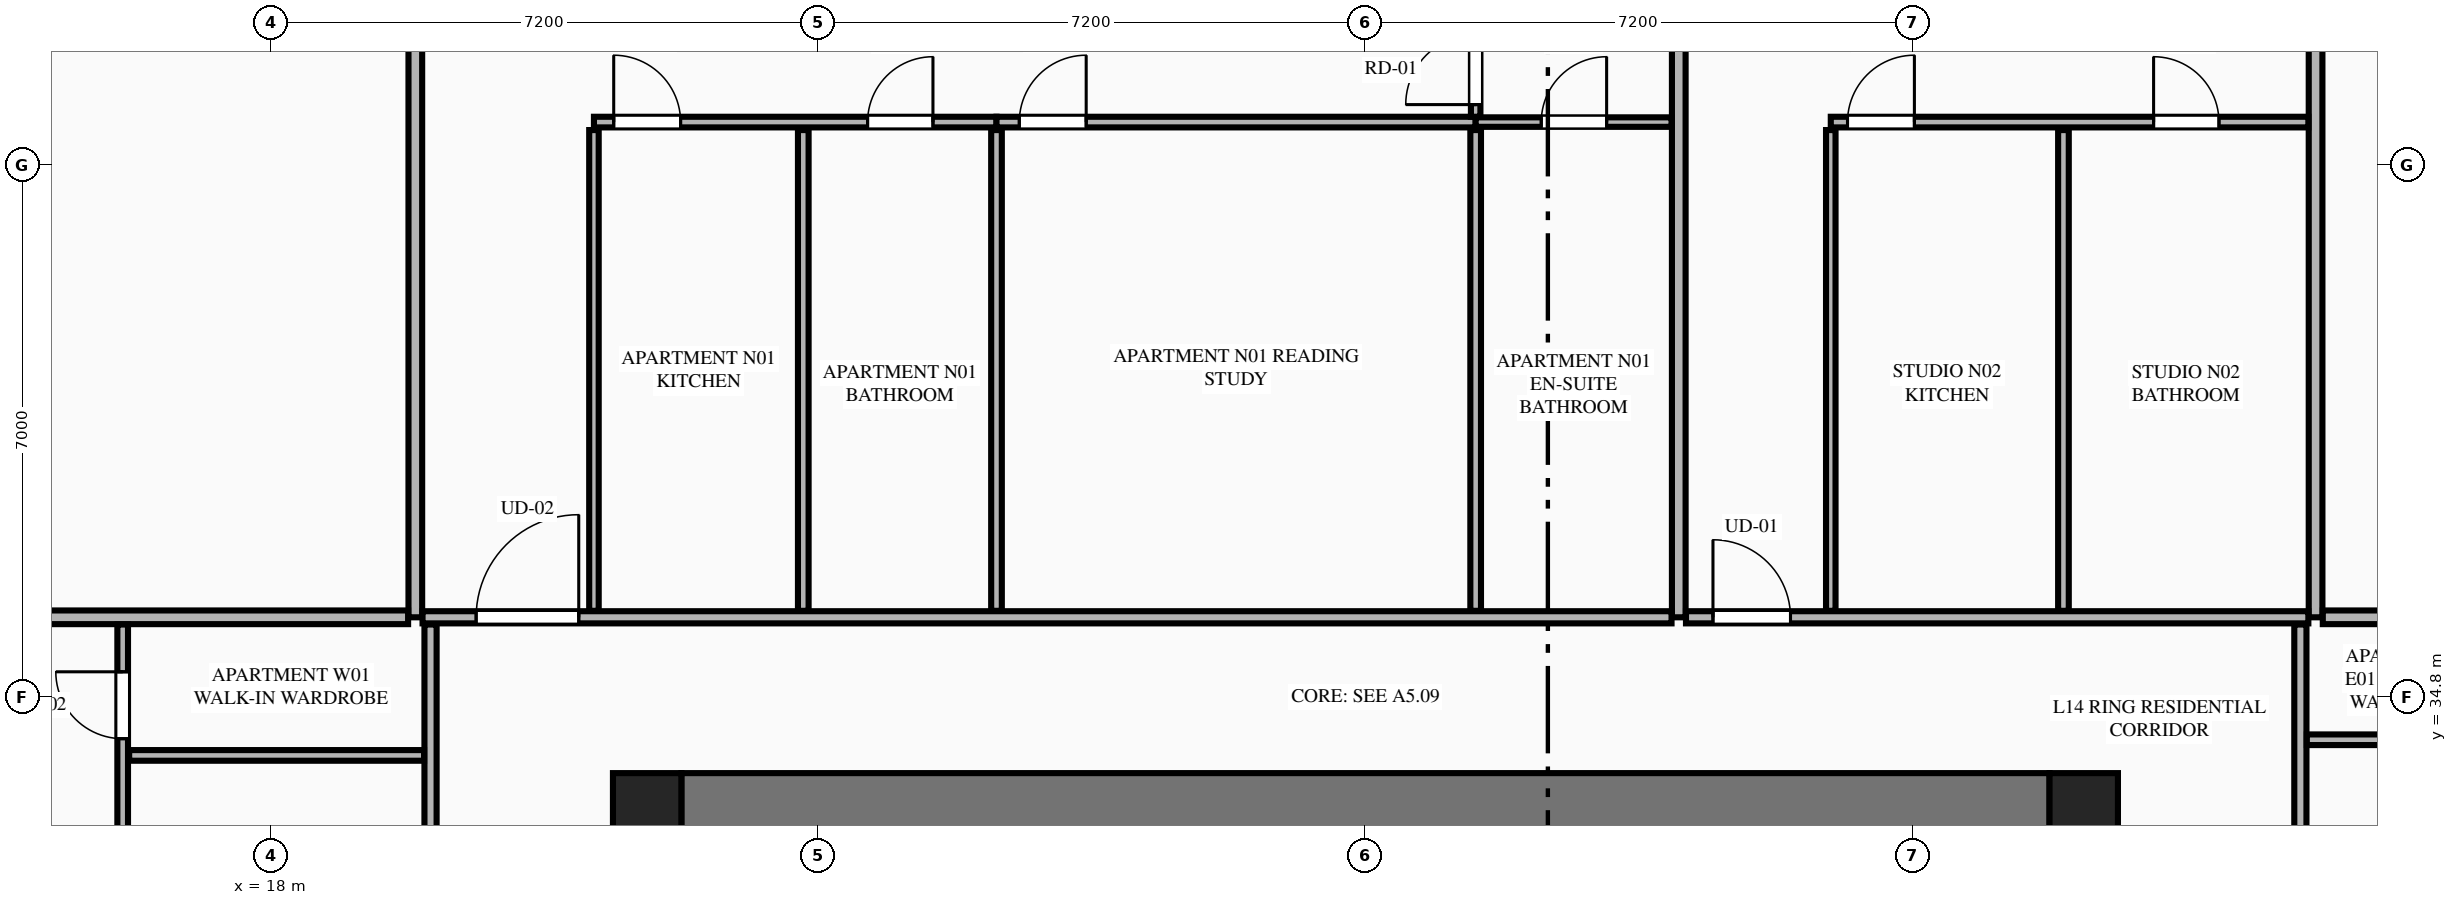
"""IFC4 building model, lengths in metres.
Left out: names, types, materials, properties, quantities, classifications, styles, units other than length and angle.
Written with IfcOpenShell. Run it as: python <this file> out.ifc"""

import sys

from ifc_helpers import new_model, si_unit, direction, frame, frame_2d, origin, origin_2d, place, context, subcontext, project, spatial, rectangle, extrude, element, fill, save


model = new_model("IFC4")
c1 = context("Model", 3, precision=1e-05, world=origin(), true_north=direction((0.0, 1.0)))
c2 = subcontext(c1, "Body", "Model", "MODEL_VIEW")
j1 = project(units=[si_unit("LENGTHUNIT", "METRE"), si_unit("PLANEANGLEUNIT", "RADIAN")], contexts=[c1])
p1 = place(None, origin())
s1 = spatial("IfcSite", under=j1, at=p1, CompositionType="ELEMENT")
p2 = place(p1, origin())
s2 = spatial("IfcBuilding", under=s1, at=p2, CompositionType="ELEMENT")
p3 = place(p2, frame((0.0, 0.0, 56.85)))
s3 = spatial("IfcBuildingStorey", under=s2, at=p3, CompositionType="ELEMENT", Elevation=56.85)
for number, where, z_axis, x_axis in (
    (1, (41.85, 33.35, 0.0), (0.0, 0.0, 1.0), (1.0, 0.0, 0.0)),
    (2, (22.95, 33.35, 0.0), (0.0, 0.0, 1.0), (1.0, 0.0, 0.0)),
):
    element("IfcColumn", number, at=place(p3, frame(where, z_axis=z_axis, x_axis=x_axis)), inside=s3, PredefinedType="COLUMN", context=c2, shape_type="SweptSolid", body=[
        extrude(rectangle(XDim=0.9, YDim=0.9, at=origin_2d()), origin(), (0.0, 0.0, 1.0), 3.55),
    ])
p4 = place(p3, frame((23.4, 33.35, 0.0), z_axis=(0.0, 0.0, 1.0), x_axis=(1.0, 0.0, 0.0)))
e3 = element("IfcWall", 3, at=p4, inside=s3, PredefinedType="SHEAR", context=c2, shape_type="SweptSolid", body=[
    extrude(rectangle(XDim=18.0, YDim=0.9, at=frame_2d((9.0, 0.0))), origin(), (0.0, 0.0, 1.0), 3.33),
])
p5 = place(p3, frame((15.634, 46.146, 0.0), z_axis=(0.0, 0.0, 1.0), x_axis=(-0.451697561555, -0.892171123095, 0.0)))
e4 = element("IfcWall", 4, at=p5, inside=s3, PredefinedType="STANDARD", context=c2, shape_type="SweptSolid", body=[
    extrude(rectangle(XDim=5.351, YDim=0.34, at=frame_2d((2.675, 0.0))), origin(), (0.0, 0.0, 1.0), 2.787),
])
p6 = place(p5, frame((2.125, 0.0, 0.75)))
e5 = element("IfcOpeningElement", 5, at=p6, cuts=e4, PredefinedType="OPENING", context=c2, shape_type="SweptSolid", body=[
    extrude(rectangle(XDim=1.1, YDim=1.887, at=frame_2d((0.55, 0.943))), frame((0.0, 0.18, 0.0), z_axis=(0.0, -1.0, 0.0), x_axis=(1.0, 0.0, 0.0)), (0.0, 0.0, 1.0), 0.36),
])
p7 = place(p3, frame((19.9, 35.85, 0.0), z_axis=(0.0, 0.0, 1.0), x_axis=(0.0, 1.0, 0.0)))
e6 = element("IfcWall", 6, at=p7, inside=s3, PredefinedType="PARTITIONING", context=c2, shape_type="SweptSolid", body=[
    extrude(rectangle(XDim=13.295, YDim=0.18, at=frame_2d((6.647, 0.0))), origin(), (0.0, 0.0, 1.0), 3.33),
])
p8 = place(p3, frame((36.522, 35.85, 0.0), z_axis=(0.0, 0.0, 1.0), x_axis=(0.0, 1.0, 0.0)))
e7 = element("IfcWall", 7, at=p8, inside=s3, PredefinedType="PARTITIONING", context=c2, shape_type="SweptSolid", body=[
    extrude(rectangle(XDim=13.295, YDim=0.18, at=frame_2d((6.647, 0.0))), origin(), (0.0, 0.0, 1.0), 2.7),
])
p9 = place(p3, frame((44.9, 35.85, 0.0), z_axis=(0.0, 0.0, 1.0), x_axis=(0.0, 1.0, 0.0)))
e8 = element("IfcWall", 8, at=p9, inside=s3, PredefinedType="PARTITIONING", context=c2, shape_type="SweptSolid", body=[
    extrude(rectangle(XDim=13.295, YDim=0.18, at=frame_2d((6.647, 0.0))), origin(), (0.0, 0.0, 1.0), 3.33),
])
p10 = place(p3, frame((19.995, 35.85, 0.0), z_axis=(0.0, 0.0, 1.0), x_axis=(1.0, 0.0, 0.0)))
e9 = element("IfcWall", 9, at=p10, inside=s3, PredefinedType="PARTITIONING", context=c2, shape_type="SweptSolid", body=[
    extrude(rectangle(XDim=16.432, YDim=0.16, at=frame_2d((8.216, 0.0))), origin(), (0.0, 0.0, 1.0), 3.33),
])
p11 = place(p10, frame((0.705, 0.0, 0.0)))
e10 = element("IfcOpeningElement", 10, at=p11, cuts=e9, PredefinedType="OPENING", context=c2, shape_type="SweptSolid", body=[
    extrude(rectangle(XDim=1.35, YDim=2.35, at=frame_2d((0.675, 1.175))), frame((0.0, 0.09, 0.0), z_axis=(0.0, -1.0, 0.0), x_axis=(1.0, 0.0, 0.0)), (0.0, 0.0, 1.0), 0.18),
])
p12 = place(p3, frame((22.25, 35.935, 0.0), z_axis=(0.0, 0.0, 1.0), x_axis=(0.0, 1.0, 0.0)))
e11 = element("IfcWall", 11, at=p12, inside=s3, PredefinedType="PARTITIONING", context=c2, shape_type="SweptSolid", body=[
    extrude(rectangle(XDim=6.325, YDim=0.125, at=frame_2d((3.163, 0.0))), origin(), (0.0, 0.0, 1.0), 2.7),
])
p13 = place(p3, frame((22.25, 42.365, 0.0), z_axis=(0.0, 0.0, 1.0), x_axis=(1.0, 0.0, 0.0)))
e12 = element("IfcWall", 12, at=p13, inside=s3, PredefinedType="PLUMBINGWALL", context=c2, shape_type="SweptSolid", body=[
    extrude(rectangle(XDim=5.296, YDim=0.14, at=frame_2d((2.648, 0.0))), origin(), (0.0, 0.0, 1.0), 3.33),
])
p14 = place(p13, frame((3.6, 0.0, 0.0)))
e13 = element("IfcOpeningElement", 13, at=p14, cuts=e12, PredefinedType="OPENING", context=c2, shape_type="SweptSolid", body=[
    extrude(rectangle(XDim=0.86, YDim=2.1, at=frame_2d((0.43, 1.05))), frame((0.0, 0.08, 0.0), z_axis=(0.0, -1.0, 0.0), x_axis=(1.0, 0.0, 0.0)), (0.0, 0.0, 1.0), 0.16),
])
p15 = place(p13, frame((0.26, 0.0, 0.0)))
e14 = element("IfcOpeningElement", 14, at=p15, cuts=e12, PredefinedType="OPENING", context=c2, shape_type="SweptSolid", body=[
    extrude(rectangle(XDim=0.88, YDim=2.15, at=frame_2d((0.44, 1.075))), frame((0.0, 0.08, 0.0), z_axis=(0.0, -1.0, 0.0), x_axis=(1.0, 0.0, 0.0)), (0.0, 0.0, 1.0), 0.16),
])
p16 = place(p3, frame((27.546, 42.365, 0.0), z_axis=(0.0, 0.0, 1.0), x_axis=(1.0, 0.0, 0.0)))
e15 = element("IfcWall", 15, at=p16, inside=s3, PredefinedType="PLUMBINGWALL", context=c2, shape_type="SweptSolid", body=[
    extrude(rectangle(XDim=6.304, YDim=0.14, at=frame_2d((3.152, 0.0))), origin(), (0.0, 0.0, 1.0), 3.33),
])
p17 = place(p16, frame((0.3, 0.0, 0.0)))
e16 = element("IfcOpeningElement", 16, at=p17, cuts=e15, PredefinedType="OPENING", context=c2, shape_type="SweptSolid", body=[
    extrude(rectangle(XDim=0.88, YDim=2.15, at=frame_2d((0.44, 1.075))), frame((0.0, 0.08, 0.0), z_axis=(0.0, -1.0, 0.0), x_axis=(1.0, 0.0, 0.0)), (0.0, 0.0, 1.0), 0.16),
])
p18 = place(p3, frame((33.85, 42.365, 0.0), z_axis=(0.0, 0.0, 1.0), x_axis=(1.0, 0.0, 0.0)))
e17 = element("IfcWall", 17, at=p18, inside=s3, PredefinedType="PARTITIONING", context=c2, shape_type="SweptSolid", body=[
    extrude(rectangle(XDim=2.577, YDim=0.125, at=frame_2d((1.289, 0.0))), origin(), (0.0, 0.0, 1.0), 3.33),
])
p19 = place(p18, frame((0.863, 0.0, 0.0)))
e18 = element("IfcOpeningElement", 18, at=p19, cuts=e17, PredefinedType="OPENING", context=c2, shape_type="SweptSolid", body=[
    extrude(rectangle(XDim=0.86, YDim=2.1, at=frame_2d((0.43, 1.05))), frame((0.0, 0.073, 0.0), z_axis=(0.0, -1.0, 0.0), x_axis=(1.0, 0.0, 0.0)), (0.0, 0.0, 1.0), 0.145),
])
p20 = place(p3, frame((25.004, 35.935, 0.0), z_axis=(0.0, 0.0, 1.0), x_axis=(0.0, 1.0, 0.0)))
e19 = element("IfcWall", 19, at=p20, inside=s3, PredefinedType="PLUMBINGWALL", context=c2, shape_type="SweptSolid", body=[
    extrude(rectangle(XDim=6.325, YDim=0.14, at=frame_2d((3.163, 0.0))), origin(), (0.0, 0.0, 1.0), 3.33),
])
p21 = place(p3, frame((33.85, 42.435, 0.0), z_axis=(0.0, 0.0, 1.0), x_axis=(0.0, 1.0, 0.0)))
e20 = element("IfcWall", 20, at=p21, inside=s3, PredefinedType="PARTITIONING", context=c2, shape_type="SweptSolid", body=[
    extrude(rectangle(XDim=1.33, YDim=0.125, at=frame_2d((0.665, 0.0))), origin(), (0.0, 0.0, 1.0), 3.33),
])
p22 = place(p21, frame((0.16, 0.0, 0.0)))
e21 = element("IfcOpeningElement", 21, at=p22, cuts=e20, PredefinedType="OPENING", context=c2, shape_type="SweptSolid", body=[
    extrude(rectangle(XDim=0.92, YDim=2.15, at=frame_2d((0.46, 1.075))), frame((0.0, 0.073, 0.0), z_axis=(0.0, -1.0, 0.0), x_axis=(1.0, 0.0, 0.0)), (0.0, 0.0, 1.0), 0.145),
])
for number, where, z_axis, x_axis in (
    (22, (27.546, 35.935, 0.0), (0.0, 0.0, 1.0), (0.0, 1.0, 0.0)),
    (23, (33.85, 35.935, 0.0), (0.0, 0.0, 1.0), (0.0, 1.0, 0.0)),
):
    element("IfcWall", number, at=place(p3, frame(where, z_axis=z_axis, x_axis=x_axis)), inside=s3, PredefinedType="PLUMBINGWALL", context=c2, shape_type="SweptSolid", body=[
        extrude(rectangle(XDim=6.325, YDim=0.14, at=frame_2d((3.163, 0.0))), origin(), (0.0, 0.0, 1.0), 3.33),
    ])
p23 = place(p3, frame((36.617, 35.85, 0.0), z_axis=(0.0, 0.0, 1.0), x_axis=(1.0, 0.0, 0.0)))
e24 = element("IfcWall", 24, at=p23, inside=s3, PredefinedType="PARTITIONING", context=c2, shape_type="SweptSolid", body=[
    extrude(rectangle(XDim=8.188, YDim=0.16, at=frame_2d((4.094, 0.0))), origin(), (0.0, 0.0, 1.0), 3.33),
])
p24 = place(p23, frame((0.355, 0.0, 0.0)))
e25 = element("IfcOpeningElement", 25, at=p24, cuts=e24, PredefinedType="OPENING", context=c2, shape_type="SweptSolid", body=[
    extrude(rectangle(XDim=1.02, YDim=2.25, at=frame_2d((0.51, 1.125))), frame((0.0, 0.09, 0.0), z_axis=(0.0, -1.0, 0.0), x_axis=(1.0, 0.0, 0.0)), (0.0, 0.0, 1.0), 0.18),
])
p25 = place(p3, frame((38.522, 35.935, 0.0), z_axis=(0.0, 0.0, 1.0), x_axis=(0.0, 1.0, 0.0)))
e26 = element("IfcWall", 26, at=p25, inside=s3, PredefinedType="PARTITIONING", context=c2, shape_type="SweptSolid", body=[
    extrude(rectangle(XDim=6.325, YDim=0.125, at=frame_2d((3.163, 0.0))), origin(), (0.0, 0.0, 1.0), 3.33),
])
p26 = place(p3, frame((38.522, 42.365, 0.0), z_axis=(0.0, 0.0, 1.0), x_axis=(1.0, 0.0, 0.0)))
e27 = element("IfcWall", 27, at=p26, inside=s3, PredefinedType="PLUMBINGWALL", context=c2, shape_type="SweptSolid", body=[
    extrude(rectangle(XDim=6.283, YDim=0.14, at=frame_2d((3.142, 0.0))), origin(), (0.0, 0.0, 1.0), 3.33),
])
p27 = place(p26, frame((4.247, 0.0, 0.0)))
e28 = element("IfcOpeningElement", 28, at=p27, cuts=e27, PredefinedType="OPENING", context=c2, shape_type="SweptSolid", body=[
    extrude(rectangle(XDim=0.86, YDim=2.1, at=frame_2d((0.43, 1.05))), frame((0.0, 0.08, 0.0), z_axis=(0.0, -1.0, 0.0), x_axis=(1.0, 0.0, 0.0)), (0.0, 0.0, 1.0), 0.16),
])
p28 = place(p26, frame((0.22, 0.0, 0.0)))
e29 = element("IfcOpeningElement", 29, at=p28, cuts=e27, PredefinedType="OPENING", context=c2, shape_type="SweptSolid", body=[
    extrude(rectangle(XDim=0.88, YDim=2.15, at=frame_2d((0.44, 1.075))), frame((0.0, 0.08, 0.0), z_axis=(0.0, -1.0, 0.0), x_axis=(1.0, 0.0, 0.0)), (0.0, 0.0, 1.0), 0.16),
])
p29 = place(p3, frame((41.583, 35.935, 0.0), z_axis=(0.0, 0.0, 1.0), x_axis=(0.0, 1.0, 0.0)))
e30 = element("IfcWall", 30, at=p29, inside=s3, PredefinedType="PLUMBINGWALL", context=c2, shape_type="SweptSolid", body=[
    extrude(rectangle(XDim=6.325, YDim=0.14, at=frame_2d((3.163, 0.0))), origin(), (0.0, 0.0, 1.0), 3.33),
])
for number, where, z_axis, x_axis in (
    (31, (10.665, 35.85, 0.0), (0.0, 0.0, 1.0), (1.0, 0.0, 0.0)),
    (32, (44.995, 35.85, 0.0), (0.0, 0.0, 1.0), (1.0, 0.0, 0.0)),
):
    element("IfcWall", number, at=place(p3, frame(where, z_axis=z_axis, x_axis=x_axis)), inside=s3, PredefinedType="PARTITIONING", context=c2, shape_type="SweptSolid", body=[
        extrude(rectangle(XDim=9.14, YDim=0.18, at=frame_2d((4.57, 0.0))), origin(), (0.0, 0.0, 1.0), 3.33),
    ])
p30 = place(p3, frame((20.1, 16.045, 0.0), z_axis=(0.0, 0.0, 1.0), x_axis=(0.0, 1.0, 0.0)))
e33 = element("IfcWall", 33, at=p30, inside=s3, PredefinedType="PARTITIONING", context=c2, shape_type="SweptSolid", body=[
    extrude(rectangle(XDim=19.71, YDim=0.16, at=frame_2d((9.855, 0.0))), origin(), (0.0, 0.0, 1.0), 2.7),
])
p31 = place(p30, frame((0.45, 0.0, 0.0)))
e34 = element("IfcOpeningElement", 34, at=p31, cuts=e33, PredefinedType="OPENING", context=c2, shape_type="SweptSolid", body=[
    extrude(rectangle(XDim=1.02, YDim=2.25, at=frame_2d((0.51, 1.125))), frame((0.0, 0.09, 0.0), z_axis=(0.0, -1.0, 0.0), x_axis=(1.0, 0.0, 0.0)), (0.0, 0.0, 1.0), 0.18),
])
p32 = place(p3, frame((16.05, 30.467, 0.0), z_axis=(0.0, 0.0, 1.0), x_axis=(0.0, 1.0, 0.0)))
e35 = element("IfcWall", 35, at=p32, inside=s3, PredefinedType="PLUMBINGWALL", context=c2, shape_type="SweptSolid", body=[
    extrude(rectangle(XDim=5.288, YDim=0.14, at=frame_2d((2.644, 0.0))), origin(), (0.0, 0.0, 1.0), 3.33),
])
p33 = place(p32, frame((0.22, 0.0, 0.0)))
e36 = element("IfcOpeningElement", 36, at=p33, cuts=e35, PredefinedType="OPENING", context=c2, shape_type="SweptSolid", body=[
    extrude(rectangle(XDim=0.86, YDim=2.1, at=frame_2d((0.43, 1.05))), frame((0.0, 0.08, 0.0), z_axis=(0.0, -1.0, 0.0), x_axis=(1.0, 0.0, 0.0)), (0.0, 0.0, 1.0), 0.16),
])
p34 = place(p32, frame((3.786, 0.0, 0.0)))
e37 = element("IfcOpeningElement", 37, at=p34, cuts=e35, PredefinedType="OPENING", context=c2, shape_type="SweptSolid", body=[
    extrude(rectangle(XDim=0.88, YDim=2.15, at=frame_2d((0.44, 1.075))), frame((0.0, 0.08, 0.0), z_axis=(0.0, -1.0, 0.0), x_axis=(1.0, 0.0, 0.0)), (0.0, 0.0, 1.0), 0.16),
])
p35 = place(p3, frame((16.135, 34.033, 0.0), z_axis=(0.0, 0.0, 1.0), x_axis=(1.0, 0.0, 0.0)))
e38 = element("IfcWall", 38, at=p35, inside=s3, PredefinedType="PLUMBINGWALL", context=c2, shape_type="SweptSolid", body=[
    extrude(rectangle(XDim=3.88, YDim=0.14, at=frame_2d((1.94, 0.0))), origin(), (0.0, 0.0, 1.0), 2.7),
])
p36 = place(p3, frame((44.7, 16.045, 0.0), z_axis=(0.0, 0.0, 1.0), x_axis=(0.0, 1.0, 0.0)))
e39 = element("IfcWall", 39, at=p36, inside=s3, PredefinedType="PARTITIONING", context=c2, shape_type="SweptSolid", body=[
    extrude(rectangle(XDim=19.71, YDim=0.16, at=frame_2d((9.855, 0.0))), origin(), (0.0, 0.0, 1.0), 2.7),
])
p37 = place(p36, frame((0.45, 0.0, 0.0)))
e40 = element("IfcOpeningElement", 40, at=p37, cuts=e39, PredefinedType="OPENING", context=c2, shape_type="SweptSolid", body=[
    extrude(rectangle(XDim=1.02, YDim=2.25, at=frame_2d((0.51, 1.125))), frame((0.0, 0.09, 0.0), z_axis=(0.0, -1.0, 0.0), x_axis=(1.0, 0.0, 0.0)), (0.0, 0.0, 1.0), 0.18),
])
p38 = place(p3, frame((44.785, 34.239, 0.0), z_axis=(0.0, 0.0, 1.0), x_axis=(1.0, 0.0, 0.0)))
e41 = element("IfcWall", 41, at=p38, inside=s3, PredefinedType="PLUMBINGWALL", context=c2, shape_type="SweptSolid", body=[
    extrude(rectangle(XDim=3.93, YDim=0.14, at=frame_2d((1.965, 0.0))), origin(), (0.0, 0.0, 1.0), 2.7),
])
p39 = place(p14, origin())
e42 = element("IfcDoor", 42, at=p39, inside=s3, OperationType="SINGLE_SWING_RIGHT", PredefinedType="DOOR", context=c2, shape_type="SweptSolid", body=[
    extrude(rectangle(XDim=0.86, YDim=2.1, at=frame_2d((0.43, 1.05))), frame((0.0, 0.025, 0.0), z_axis=(0.0, -1.0, 0.0), x_axis=(1.0, 0.0, 0.0)), (0.0, 0.0, 1.0), 0.05),
])
fill(e13, e42)
p40 = place(p19, origin())
e43 = element("IfcDoor", 43, at=p40, inside=s3, OperationType="SINGLE_SWING_RIGHT", PredefinedType="DOOR", context=c2, shape_type="SweptSolid", body=[
    extrude(rectangle(XDim=0.86, YDim=2.1, at=frame_2d((0.43, 1.05))), frame((0.0, 0.025, 0.0), z_axis=(0.0, -1.0, 0.0), x_axis=(1.0, 0.0, 0.0)), (0.0, 0.0, 1.0), 0.05),
])
fill(e18, e43)
p41 = place(p11, origin())
e44 = element("IfcDoor", 44, at=p41, inside=s3, OperationType="SINGLE_SWING_RIGHT", PredefinedType="DOOR", context=c2, shape_type="SweptSolid", body=[
    extrude(rectangle(XDim=1.35, YDim=2.35, at=frame_2d((0.675, 1.175))), frame((0.0, 0.025, 0.0), z_axis=(0.0, -1.0, 0.0), x_axis=(1.0, 0.0, 0.0)), (0.0, 0.0, 1.0), 0.05),
])
fill(e10, e44)
p42 = place(p15, origin())
e45 = element("IfcDoor", 45, at=p42, inside=s3, OperationType="SINGLE_SWING_LEFT", PredefinedType="DOOR", context=c2, shape_type="SweptSolid", body=[
    extrude(rectangle(XDim=0.88, YDim=2.15, at=frame_2d((0.44, 1.075))), frame((0.0, 0.025, 0.0), z_axis=(0.0, -1.0, 0.0), x_axis=(1.0, 0.0, 0.0)), (0.0, 0.0, 1.0), 0.05),
])
fill(e14, e45)
p43 = place(p17, origin())
e46 = element("IfcDoor", 46, at=p43, inside=s3, OperationType="SINGLE_SWING_RIGHT", PredefinedType="DOOR", context=c2, shape_type="SweptSolid", body=[
    extrude(rectangle(XDim=0.88, YDim=2.15, at=frame_2d((0.44, 1.075))), frame((0.0, 0.025, 0.0), z_axis=(0.0, -1.0, 0.0), x_axis=(1.0, 0.0, 0.0)), (0.0, 0.0, 1.0), 0.05),
])
fill(e16, e46)
p44 = place(p22, origin())
e47 = element("IfcDoor", 47, at=p44, inside=s3, OperationType="SINGLE_SWING_LEFT", PredefinedType="DOOR", context=c2, shape_type="SweptSolid", body=[
    extrude(rectangle(XDim=0.92, YDim=2.15, at=frame_2d((0.46, 1.075))), frame((0.0, 0.025, 0.0), z_axis=(0.0, -1.0, 0.0), x_axis=(1.0, 0.0, 0.0)), (0.0, 0.0, 1.0), 0.05),
])
fill(e21, e47)
p45 = place(p27, origin())
e48 = element("IfcDoor", 48, at=p45, inside=s3, OperationType="SINGLE_SWING_LEFT", PredefinedType="DOOR", context=c2, shape_type="SweptSolid", body=[
    extrude(rectangle(XDim=0.86, YDim=2.1, at=frame_2d((0.43, 1.05))), frame((0.0, 0.025, 0.0), z_axis=(0.0, -1.0, 0.0), x_axis=(1.0, 0.0, 0.0)), (0.0, 0.0, 1.0), 0.05),
])
fill(e28, e48)
p46 = place(p24, origin())
e49 = element("IfcDoor", 49, at=p46, inside=s3, OperationType="SINGLE_SWING_LEFT", PredefinedType="DOOR", context=c2, shape_type="SweptSolid", body=[
    extrude(rectangle(XDim=1.02, YDim=2.25, at=frame_2d((0.51, 1.125))), frame((0.0, 0.025, 0.0), z_axis=(0.0, -1.0, 0.0), x_axis=(1.0, 0.0, 0.0)), (0.0, 0.0, 1.0), 0.05),
])
fill(e25, e49)
p47 = place(p28, origin())
e50 = element("IfcDoor", 50, at=p47, inside=s3, OperationType="SINGLE_SWING_RIGHT", PredefinedType="DOOR", context=c2, shape_type="SweptSolid", body=[
    extrude(rectangle(XDim=0.88, YDim=2.15, at=frame_2d((0.44, 1.075))), frame((0.0, 0.025, 0.0), z_axis=(0.0, -1.0, 0.0), x_axis=(1.0, 0.0, 0.0)), (0.0, 0.0, 1.0), 0.05),
])
fill(e29, e50)
p48 = place(p34, origin())
e51 = element("IfcDoor", 51, at=p48, inside=s3, OperationType="SINGLE_SWING_RIGHT", PredefinedType="DOOR", context=c2, shape_type="SweptSolid", body=[
    extrude(rectangle(XDim=0.88, YDim=2.15, at=frame_2d((0.44, 1.075))), frame((0.0, 0.025, 0.0), z_axis=(0.0, -1.0, 0.0), x_axis=(1.0, 0.0, 0.0)), (0.0, 0.0, 1.0), 0.05),
])
fill(e37, e51)
save(model, sys.argv[1])
